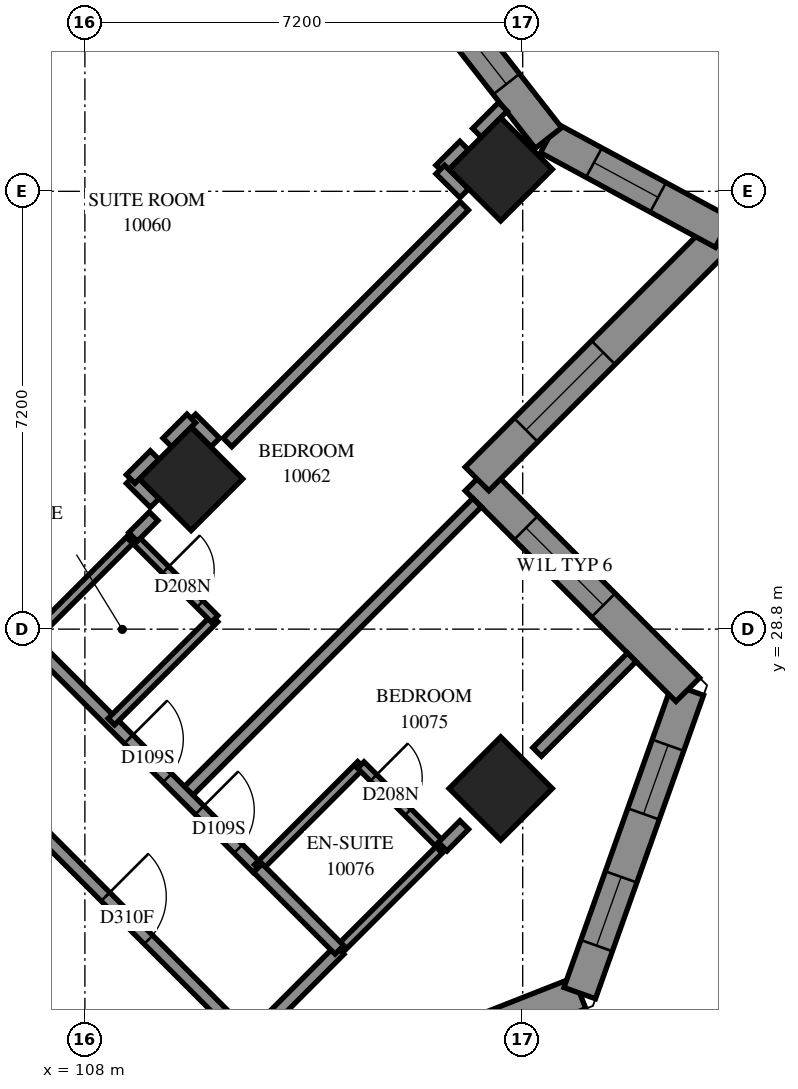
"""IFC4 building model, lengths in metres.
Left out: names, types, materials, properties, quantities, classifications, styles, units other than length and angle.
Written with IfcOpenShell. Run it as: python <this file> out.ifc"""

import sys

from ifc_helpers import new_model, si_unit, direction, frame, frame_2d, origin, origin_2d, place, context, subcontext, project, spatial, polyline, rectangle, outline, extrude, element, fill, save


model = new_model("IFC4")
c1 = context("Model", 3, precision=1e-05, world=origin(), true_north=direction((0.0, 1.0)))
c2 = subcontext(c1, "Body", "Model", "MODEL_VIEW")
j1 = project(units=[si_unit("LENGTHUNIT", "METRE"), si_unit("PLANEANGLEUNIT", "RADIAN")], contexts=[c1])
p1 = place(None, origin())
s1 = spatial("IfcSite", under=j1, at=p1, CompositionType="ELEMENT")
p2 = place(p1, origin())
s2 = spatial("IfcBuilding", under=s1, at=p2, CompositionType="ELEMENT")
p3 = place(p2, frame((0.0, 0.0, 40.6)))
s3 = spatial("IfcBuildingStorey", under=s2, at=p3, CompositionType="ELEMENT", Elevation=40.6)
for number, where, z_axis, x_axis in (
    (1, (114.838, 36.362, 0.0), (0.0, 0.0, 1.0), (0.707, -0.707, 0.0)),
    (2, (109.747, 31.271, 0.0), (0.0, 0.0, 1.0), (0.707, -0.707, 0.0)),
    (3, (114.838, 26.18, 0.0), (0.0, 0.0, 1.0), (0.707, -0.707, 0.0)),
):
    element("IfcColumn", number, at=place(p3, frame(where, z_axis=z_axis, x_axis=x_axis)), inside=s3, PredefinedType="COLUMN", context=c2, shape_type="SweptSolid", body=[
        extrude(rectangle(XDim=1.2, YDim=1.2, at=origin_2d()), origin(), (0.0, 0.0, 1.0), 3.1),
    ])
p4 = place(p3, frame((111.012, 20.798, 0.0), z_axis=(0.0, 0.0, 1.0), x_axis=(0.9305394819, 0.3661915791, 0.0)))
e4 = element("IfcWall", 4, at=p4, inside=s3, PredefinedType="SOLIDWALL", context=c2, shape_type="SweptSolid", body=[
    extrude(outline(polyline([(0.12, -0.275), (5.633, -0.275), (5.383, 0.275), (-0.12, 0.275), (0.12, -0.275)])), origin(), (0.0, 0.0, 1.0), 3.1),
])
p5 = place(p4, frame((1.166, 0.0, 0.5)))
e5 = element("IfcOpeningElement", 5, at=p5, cuts=e4, PredefinedType="OPENING", context=c2, shape_type="SweptSolid", body=[
    extrude(rectangle(XDim=2.8, YDim=2.45, at=frame_2d((1.4, 1.225))), frame((0.0, 0.285, 0.0), z_axis=(0.0, -1.0, 0.0), x_axis=(1.0, 0.0, 0.0)), (0.0, 0.0, 1.0), 0.57),
])
p6 = place(p3, frame((116.138, 22.815, 0.0), z_axis=(0.0, 0.0, 1.0), x_axis=(0.3355194748, 0.9420332701, 0.0)))
e6 = element("IfcWall", 6, at=p6, inside=s3, PredefinedType="SOLIDWALL", context=c2, shape_type="SweptSolid", body=[
    extrude(outline(polyline([(-0.125, -0.275), (5.471, -0.275), (5.123, 0.275), (0.125, 0.275), (-0.125, -0.275)])), origin(), (0.0, 0.0, 1.0), 3.1),
])
p7 = place(p6, frame((0.828, 0.0, 0.5)))
e7 = element("IfcOpeningElement", 7, at=p7, cuts=e6, PredefinedType="OPENING", context=c2, shape_type="SweptSolid", body=[
    extrude(rectangle(XDim=1.2, YDim=2.45, at=frame_2d((0.6, 1.225))), frame((0.0, 0.285, 0.0), z_axis=(0.0, -1.0, 0.0), x_axis=(1.0, 0.0, 0.0)), (0.0, 0.0, 1.0), 0.57),
])
p8 = place(p6, frame((3.127, 0.0, 0.5)))
e8 = element("IfcOpeningElement", 8, at=p8, cuts=e6, PredefinedType="OPENING", context=c2, shape_type="SweptSolid", body=[
    extrude(rectangle(XDim=1.2, YDim=2.45, at=frame_2d((0.6, 1.225))), frame((0.0, 0.285, 0.0), z_axis=(0.0, -1.0, 0.0), x_axis=(1.0, 0.0, 0.0)), (0.0, 0.0, 1.0), 0.57),
])
p9 = place(p3, frame((117.915, 27.805, 0.0), z_axis=(0.0, 0.0, 1.0), x_axis=(-0.7071067812, 0.7071067812, 0.0)))
e9 = element("IfcWall", 9, at=p9, inside=s3, PredefinedType="SOLIDWALL", context=c2, shape_type="SweptSolid", body=[
    extrude(outline(polyline([(-0.174, -0.275), (4.626, -0.275), (5.176, 0.275), (0.174, 0.275), (-0.174, -0.275)])), origin(), (0.0, 0.0, 1.0), 3.1),
])
p10 = place(p9, frame((1.964, 0.0, 0.6)))
e10 = element("IfcOpeningElement", 10, at=p10, cuts=e9, PredefinedType="OPENING", context=c2, shape_type="SweptSolid", body=[
    extrude(rectangle(XDim=1.8, YDim=1.9, at=frame_2d((0.9, 0.95))), frame((0.0, 0.285, 0.0), z_axis=(0.0, -1.0, 0.0), x_axis=(1.0, 0.0, 0.0)), (0.0, 0.0, 1.0), 0.57),
])
p11 = place(p3, frame((114.449, 31.271, 0.0), z_axis=(0.0, 0.0, 1.0), x_axis=(0.7070980511, 0.7071155112, 0.0)))
e11 = element("IfcWall", 11, at=p11, inside=s3, PredefinedType="SOLIDWALL", context=c2, shape_type="SweptSolid", body=[
    extrude(outline(polyline([(0.275, -0.275), (6.096, -0.275), (5.359, 0.275), (-0.275, 0.275), (0.275, -0.275)])), origin(), (0.0, 0.0, 1.0), 3.1),
])
p12 = place(p11, frame((1.137, 0.0, 0.6)))
e12 = element("IfcOpeningElement", 12, at=p12, cuts=e11, PredefinedType="OPENING", context=c2, shape_type="SweptSolid", body=[
    extrude(rectangle(XDim=1.8, YDim=1.9, at=frame_2d((0.9, 0.95))), frame((0.0, 0.285, 0.0), z_axis=(0.0, -1.0, 0.0), x_axis=(1.0, 0.0, 0.0)), (0.0, 0.0, 1.0), 0.57),
])
p13 = place(p3, frame((118.499, 35.321, 0.0), z_axis=(0.0, 0.0, 1.0), x_axis=(-0.8793629348, 0.476152107, 0.0)))
e13 = element("IfcWall", 13, at=p13, inside=s3, PredefinedType="SOLIDWALL", context=c2, shape_type="SweptSolid", body=[
    extrude(outline(polyline([(-0.369, -0.275), (3.212, -0.275), (3.327, 0.275), (0.369, 0.275), (-0.369, -0.275)])), origin(), (0.0, 0.0, 1.0), 3.1),
])
p14 = place(p13, frame((1.219, 0.0, 0.5)))
e14 = element("IfcOpeningElement", 14, at=p14, cuts=e13, PredefinedType="OPENING", context=c2, shape_type="SweptSolid", body=[
    extrude(rectangle(XDim=1.2, YDim=2.45, at=frame_2d((0.6, 1.225))), frame((0.0, 0.285, 0.0), z_axis=(0.0, -1.0, 0.0), x_axis=(1.0, 0.0, 0.0)), (0.0, 0.0, 1.0), 0.57),
])
p15 = place(p3, frame((115.624, 36.877, 0.0), z_axis=(0.0, 0.0, 1.0), x_axis=(-0.6157582888, 0.7879351051, 0.0)))
e15 = element("IfcWall", 15, at=p15, inside=s3, PredefinedType="SOLIDWALL", context=c2, shape_type="SweptSolid", body=[
    extrude(outline(polyline([(0.057, -0.275), (3.516, -0.275), (3.448, 0.275), (-0.057, 0.275), (0.057, -0.275)])), origin(), (0.0, 0.0, 1.0), 3.1),
])
p16 = place(p15, frame((1.124, 0.0, 0.5)))
e16 = element("IfcOpeningElement", 16, at=p16, cuts=e15, PredefinedType="OPENING", context=c2, shape_type="SweptSolid", body=[
    extrude(rectangle(XDim=1.2, YDim=2.45, at=frame_2d((0.6, 1.225))), frame((0.0, 0.285, 0.0), z_axis=(0.0, -1.0, 0.0), x_axis=(1.0, 0.0, 0.0)), (0.0, 0.0, 1.0), 0.57),
])
p17 = place(p3, frame((99.459, 36.255, 0.0), z_axis=(0.0, 0.0, 1.0), x_axis=(0.7071905616, 0.7070229908, 0.0)))
e17 = element("IfcWall", 17, at=p17, inside=s3, PredefinedType="PARTITIONING", context=c2, shape_type="SweptSolid", body=[
    extrude(rectangle(XDim=11.935, YDim=0.2, at=frame_2d((5.968, 0.0))), origin(), (0.0, 0.0, 1.0), 3.1),
])
p18 = place(p3, frame((103.061, 29.677, 0.0), z_axis=(0.0, 0.0, 1.0), x_axis=(0.7071067812, -0.7071067812, 0.0)))
e18 = element("IfcWall", 18, at=p18, inside=s3, PredefinedType="PARTITIONING", context=c2, shape_type="SweptSolid", body=[
    extrude(rectangle(XDim=10.802, YDim=0.2, at=frame_2d((5.401, 0.0))), origin(), (0.0, 0.0, 1.0), 3.1),
])
p19 = place(p18, frame((2.012, 0.0, 0.0)))
e19 = element("IfcOpeningElement", 19, at=p19, cuts=e18, PredefinedType="OPENING", context=c2, shape_type="SweptSolid", body=[
    extrude(rectangle(XDim=0.9, YDim=2.1, at=frame_2d((0.45, 1.05))), frame((0.0, 0.11, 0.0), z_axis=(0.0, -1.0, 0.0), x_axis=(1.0, 0.0, 0.0)), (0.0, 0.0, 1.0), 0.22),
])
p20 = place(p18, frame((7.463, 0.0, 0.0)))
e20 = element("IfcOpeningElement", 20, at=p20, cuts=e18, PredefinedType="OPENING", context=c2, shape_type="SweptSolid", body=[
    extrude(rectangle(XDim=1.0, YDim=2.1, at=frame_2d((0.5, 1.05))), frame((0.0, 0.11, 0.0), z_axis=(0.0, -1.0, 0.0), x_axis=(1.0, 0.0, 0.0)), (0.0, 0.0, 1.0), 0.22),
])
p21 = place(p3, frame((109.64, 26.074, 0.0), z_axis=(0.0, 0.0, 1.0), x_axis=(0.7072538194, 0.7069597124, 0.0)))
e21 = element("IfcWall", 21, at=p21, inside=s3, PredefinedType="PARTITIONING", context=c2, shape_type="SweptSolid", body=[
    extrude(rectangle(XDim=6.8, YDim=0.2, at=frame_2d((3.4, 0.0))), origin(), (0.0, 0.0, 1.0), 3.1),
])
for number, where, z_axis, x_axis in (
    (22, (110.345, 31.871, 0.0), (0.0, 0.0, 1.0), (0.707, 0.707, 0.0)),
    (23, (105.255, 36.963, 0.0), (0.0, 0.0, 1.0), (0.707, 0.707, 0.0)),
):
    element("IfcWall", number, at=place(p3, frame(where, z_axis=z_axis, x_axis=x_axis)), inside=s3, PredefinedType="PARTITIONING", context=c2, shape_type="SweptSolid", body=[
        extrude(rectangle(XDim=5.504, YDim=0.2, at=frame_2d((2.752, 0.0))), origin(), (0.0, 0.0, 1.0), 3.1),
    ])
p22 = place(p3, frame((107.093, 28.615, 0.0), z_axis=(0.0, 0.0, 1.0), x_axis=(0.7072011313, -0.7070124185, 0.0)))
e24 = element("IfcWall", 24, at=p22, inside=s3, PredefinedType="PARTITIONING", context=c2, shape_type="SweptSolid", body=[
    extrude(rectangle(XDim=5.299, YDim=0.2, at=frame_2d((2.65, 0.0))), origin(), (0.0, 0.0, 1.0), 3.1),
])
p23 = place(p22, frame((2.299, 0.0, 0.0)))
e25 = element("IfcOpeningElement", 25, at=p23, cuts=e24, PredefinedType="OPENING", context=c2, shape_type="SweptSolid", body=[
    extrude(rectangle(XDim=0.9, YDim=2.1, at=frame_2d((0.45, 1.05))), frame((0.0, 0.11, 0.0), z_axis=(0.0, -1.0, 0.0), x_axis=(1.0, 0.0, 0.0)), (0.0, 0.0, 1.0), 0.22),
])
p24 = place(p22, frame((3.949, 0.0, 0.0)))
e26 = element("IfcOpeningElement", 26, at=p24, cuts=e24, PredefinedType="OPENING", context=c2, shape_type="SweptSolid", body=[
    extrude(rectangle(XDim=0.9, YDim=2.1, at=frame_2d((0.45, 1.05))), frame((0.0, 0.11, 0.0), z_axis=(0.0, -1.0, 0.0), x_axis=(1.0, 0.0, 0.0)), (0.0, 0.0, 1.0), 0.22),
])
p25 = place(p3, frame((108.435, 27.279, 0.0), z_axis=(0.0, 0.0, 1.0), x_axis=(0.7075233388, 0.706689978, 0.0)))
e27 = element("IfcWall", 27, at=p25, inside=s3, PredefinedType="PARTITIONING", context=c2, shape_type="SweptSolid", body=[
    extrude(rectangle(XDim=2.4, YDim=0.15, at=frame_2d((1.2, 0.0))), origin(), (0.0, 0.0, 1.0), 3.1),
])
p26 = place(p3, frame((112.183, 23.531, 0.0), z_axis=(0.0, 0.0, 1.0), x_axis=(0.7075233388, 0.706689978, 0.0)))
e28 = element("IfcWall", 28, at=p26, inside=s3, PredefinedType="PARTITIONING", context=c2, shape_type="SweptSolid", body=[
    extrude(rectangle(XDim=2.4, YDim=0.15, at=frame_2d((1.2, 0.0))), origin(), (0.0, 0.0, 1.0), 2.6),
])
for number, where, z_axis, x_axis in (
    (29, (107.095, 28.621, 0.0), (0.0, 0.0, 1.0), (0.707, 0.707, 0.0)),
    (30, (110.843, 24.873, 0.0), (0.0, 0.0, 1.0), (0.707, 0.707, 0.0)),
):
    element("IfcWall", number, at=place(p3, frame(where, z_axis=z_axis, x_axis=x_axis)), inside=s3, PredefinedType="PARTITIONING", context=c2, shape_type="SweptSolid", body=[
        extrude(rectangle(XDim=2.398, YDim=0.15, at=frame_2d((1.199, 0.0))), origin(), (0.0, 0.0, 1.0), 3.1),
    ])
p27 = place(p3, frame((115.438, 26.78, 0.0), z_axis=(0.0, 0.0, 1.0), x_axis=(0.7071067812, 0.7071067812, 0.0)))
e31 = element("IfcWall", 31, at=p27, inside=s3, PredefinedType="PARTITIONING", context=c2, shape_type="SweptSolid", body=[
    extrude(rectangle(XDim=2.201, YDim=0.2, at=frame_2d((1.101, 0.0))), origin(), (0.0, 0.0, 1.0), 3.1),
])
p28 = place(p3, frame((110.705, 22.039, 0.0), z_axis=(0.0, 0.0, 1.0), x_axis=(0.7066304548, 0.7075827869, 0.0)))
e32 = element("IfcWall", 32, at=p28, inside=s3, PredefinedType="PARTITIONING", context=c2, shape_type="SweptSolid", body=[
    extrude(rectangle(XDim=2.1, YDim=0.2, at=frame_2d((1.05, 0.0))), origin(), (0.0, 0.0, 1.0), 2.6),
])
p29 = place(p3, frame((108.789, 30.313, 0.0), z_axis=(0.0, 0.0, 1.0), x_axis=(0.7071067812, -0.7071067812, 0.0)))
e33 = element("IfcWall", 33, at=p29, inside=s3, PredefinedType="PARTITIONING", context=c2, shape_type="SweptSolid", body=[
    extrude(rectangle(XDim=1.901, YDim=0.15, at=frame_2d((0.95, 0.0))), origin(), (0.0, 0.0, 1.0), 3.1),
])
p30 = place(p29, frame((0.76, 0.0, 0.0)))
e34 = element("IfcOpeningElement", 34, at=p30, cuts=e33, PredefinedType="OPENING", context=c2, shape_type="SweptSolid", body=[
    extrude(rectangle(XDim=0.8, YDim=2.1, at=frame_2d((0.4, 1.05))), frame((0.0, 0.085, 0.0), z_axis=(0.0, -1.0, 0.0), x_axis=(1.0, 0.0, 0.0)), (0.0, 0.0, 1.0), 0.17),
])
p31 = place(p3, frame((112.537, 26.565, 0.0), z_axis=(0.0, 0.0, 1.0), x_axis=(0.7071067812, -0.7071067812, 0.0)))
e35 = element("IfcWall", 35, at=p31, inside=s3, PredefinedType="PARTITIONING", context=c2, shape_type="SweptSolid", body=[
    extrude(rectangle(XDim=1.901, YDim=0.15, at=frame_2d((0.95, 0.0))), origin(), (0.0, 0.0, 1.0), 3.1),
])
p32 = place(p31, frame((0.297, 0.0, 0.0)))
e36 = element("IfcOpeningElement", 36, at=p32, cuts=e35, PredefinedType="OPENING", context=c2, shape_type="SweptSolid", body=[
    extrude(rectangle(XDim=0.8, YDim=2.1, at=frame_2d((0.4, 1.05))), frame((0.0, 0.085, 0.0), z_axis=(0.0, -1.0, 0.0), x_axis=(1.0, 0.0, 0.0)), (0.0, 0.0, 1.0), 0.17),
])
p33 = place(p3, frame((110.843, 24.871, 0.0), z_axis=(0.0, 0.0, 1.0), x_axis=(0.7065800724, -0.7076330979, 0.0)))
e37 = element("IfcWall", 37, at=p33, inside=s3, PredefinedType="PARTITIONING", context=c2, shape_type="SweptSolid", body=[
    extrude(rectangle(XDim=1.899, YDim=0.2, at=frame_2d((0.95, 0.0))), origin(), (0.0, 0.0, 1.0), 3.1),
])
for number, where, z_axis, x_axis in (
    (38, (113.843, 36.359, 0.0), (0.0, 0.0, 1.0), (0.707, 0.707, 0.0)),
    (39, (108.754, 31.268, 0.0), (0.0, 0.0, 1.0), (0.707, -0.707, 0.0)),
    (40, (109.751, 32.265, 0.0), (0.0, 0.0, 1.0), (0.707, -0.707, 0.0)),
    (41, (109.355, 31.871, 0.0), (0.0, 0.0, 1.0), (0.707, 0.707, 0.0)),
    (42, (108.753, 31.269, 0.0), (0.0, 0.0, 1.0), (0.707, 0.707, 0.0)),
):
    element("IfcWall", number, at=place(p3, frame(where, z_axis=z_axis, x_axis=x_axis)), inside=s3, PredefinedType="PARTITIONING", context=c2, shape_type="SweptSolid", body=[
        extrude(rectangle(XDim=0.557, YDim=0.2, at=frame_2d((0.279, 0.0))), origin(), (0.0, 0.0, 1.0), 3.1),
    ])
p34 = place(p3, frame((113.845, 36.359, 0.0), z_axis=(0.0, 0.0, 1.0), x_axis=(0.7089037401, -0.705305244, 0.0)))
e43 = element("IfcWall", 43, at=p34, inside=s3, PredefinedType="PARTITIONING", context=c2, shape_type="SweptSolid", body=[
    extrude(rectangle(XDim=0.556, YDim=0.2, at=frame_2d((0.278, 0.0))), origin(), (0.0, 0.0, 1.0), 3.1),
])
p35 = place(p3, frame((114.447, 36.963, 0.0), z_axis=(0.0, 0.0, 1.0), x_axis=(0.7070239866, 0.707189566, 0.0)))
e44 = element("IfcWall", 44, at=p35, inside=s3, PredefinedType="PARTITIONING", context=c2, shape_type="SweptSolid", body=[
    extrude(rectangle(XDim=0.604, YDim=0.2, at=frame_2d((0.302, 0.0))), origin(), (0.0, 0.0, 1.0), 3.1),
])
p36 = place(p3, frame((113.885, 25.223, 0.0), z_axis=(0.0, 0.0, 1.0), x_axis=(0.7051121336, 0.709095818, 0.0)))
e45 = element("IfcWall", 45, at=p36, inside=s3, PredefinedType="PARTITIONING", context=c2, shape_type="SweptSolid", body=[
    extrude(rectangle(XDim=0.502, YDim=0.2, at=frame_2d((0.251, 0.0))), origin(), (0.0, 0.0, 1.0), 2.6),
])
p37 = place(p3, frame((108.791, 30.317, 0.0), z_axis=(0.0, 0.0, 1.0), x_axis=(0.7071067812, 0.7071067812, 0.0)))
e46 = element("IfcWall", 46, at=p37, inside=s3, PredefinedType="PARTITIONING", context=c2, shape_type="SweptSolid", body=[
    extrude(rectangle(XDim=0.481, YDim=0.2, at=frame_2d((0.24, 0.0))), origin(), (0.0, 0.0, 1.0), 3.1),
])
p38 = place(p7, origin())
e47 = element("IfcWindow", 47, at=p38, inside=s3, PartitioningType="SINGLE_PANEL", PredefinedType="WINDOW", context=c2, shape_type="SweptSolid", body=[
    extrude(rectangle(XDim=1.2, YDim=2.45, at=frame_2d((0.6, 1.225))), frame((0.0, 0.155, 0.0), z_axis=(0.0, -1.0, 0.0), x_axis=(1.0, 0.0, 0.0)), (0.0, 0.0, 1.0), 0.06),
])
fill(e7, e47)
p39 = place(p8, origin())
e48 = element("IfcWindow", 48, at=p39, inside=s3, PartitioningType="SINGLE_PANEL", PredefinedType="WINDOW", context=c2, shape_type="SweptSolid", body=[
    extrude(rectangle(XDim=1.2, YDim=2.45, at=frame_2d((0.6, 1.225))), frame((0.0, 0.155, 0.0), z_axis=(0.0, -1.0, 0.0), x_axis=(1.0, 0.0, 0.0)), (0.0, 0.0, 1.0), 0.06),
])
fill(e8, e48)
p40 = place(p10, origin())
e49 = element("IfcWindow", 49, at=p40, inside=s3, PartitioningType="SINGLE_PANEL", PredefinedType="WINDOW", context=c2, shape_type="SweptSolid", body=[
    extrude(rectangle(XDim=1.8, YDim=1.9, at=frame_2d((0.9, 0.95))), frame((0.0, 0.155, 0.0), z_axis=(0.0, -1.0, 0.0), x_axis=(1.0, 0.0, 0.0)), (0.0, 0.0, 1.0), 0.06),
])
fill(e10, e49)
p41 = place(p12, origin())
e50 = element("IfcWindow", 50, at=p41, inside=s3, PartitioningType="SINGLE_PANEL", PredefinedType="WINDOW", context=c2, shape_type="SweptSolid", body=[
    extrude(rectangle(XDim=1.8, YDim=1.9, at=frame_2d((0.9, 0.95))), frame((0.0, 0.155, 0.0), z_axis=(0.0, -1.0, 0.0), x_axis=(1.0, 0.0, 0.0)), (0.0, 0.0, 1.0), 0.06),
])
fill(e12, e50)
p42 = place(p14, origin())
e51 = element("IfcWindow", 51, at=p42, inside=s3, PartitioningType="SINGLE_PANEL", PredefinedType="WINDOW", context=c2, shape_type="SweptSolid", body=[
    extrude(rectangle(XDim=1.2, YDim=2.45, at=frame_2d((0.6, 1.225))), frame((0.0, 0.155, 0.0), z_axis=(0.0, -1.0, 0.0), x_axis=(1.0, 0.0, 0.0)), (0.0, 0.0, 1.0), 0.06),
])
fill(e14, e51)
p43 = place(p16, origin())
e52 = element("IfcWindow", 52, at=p43, inside=s3, PartitioningType="SINGLE_PANEL", PredefinedType="WINDOW", context=c2, shape_type="SweptSolid", body=[
    extrude(rectangle(XDim=1.2, YDim=2.45, at=frame_2d((0.6, 1.225))), frame((0.0, 0.155, 0.0), z_axis=(0.0, -1.0, 0.0), x_axis=(1.0, 0.0, 0.0)), (0.0, 0.0, 1.0), 0.06),
])
fill(e16, e52)
p44 = place(p23, origin())
e53 = element("IfcDoor", 53, at=p44, inside=s3, OperationType="SINGLE_SWING_LEFT", PredefinedType="DOOR", context=c2, shape_type="SweptSolid", body=[
    extrude(rectangle(XDim=0.9, YDim=2.1, at=frame_2d((0.45, 1.05))), frame((0.0, 0.025, 0.0), z_axis=(0.0, -1.0, 0.0), x_axis=(1.0, 0.0, 0.0)), (0.0, 0.0, 1.0), 0.05),
])
fill(e25, e53)
p45 = place(p30, origin())
e54 = element("IfcDoor", 54, at=p45, inside=s3, OperationType="SINGLE_SWING_RIGHT", PredefinedType="DOOR", context=c2, shape_type="SweptSolid", body=[
    extrude(rectangle(XDim=0.8, YDim=2.1, at=frame_2d((0.4, 1.05))), frame((0.0, 0.025, 0.0), z_axis=(0.0, -1.0, 0.0), x_axis=(1.0, 0.0, 0.0)), (0.0, 0.0, 1.0), 0.05),
])
fill(e34, e54)
p46 = place(p20, origin())
e55 = element("IfcDoor", 55, at=p46, inside=s3, OperationType="SINGLE_SWING_RIGHT", PredefinedType="DOOR", context=c2, shape_type="SweptSolid", body=[
    extrude(rectangle(XDim=1.0, YDim=2.1, at=frame_2d((0.5, 1.05))), frame((0.0, 0.025, 0.0), z_axis=(0.0, -1.0, 0.0), x_axis=(1.0, 0.0, 0.0)), (0.0, 0.0, 1.0), 0.05),
])
fill(e20, e55)
p47 = place(p24, origin())
e56 = element("IfcDoor", 56, at=p47, inside=s3, OperationType="SINGLE_SWING_RIGHT", PredefinedType="DOOR", context=c2, shape_type="SweptSolid", body=[
    extrude(rectangle(XDim=0.9, YDim=2.1, at=frame_2d((0.45, 1.05))), frame((0.0, 0.025, 0.0), z_axis=(0.0, -1.0, 0.0), x_axis=(1.0, 0.0, 0.0)), (0.0, 0.0, 1.0), 0.05),
])
fill(e26, e56)
p48 = place(p32, origin())
e57 = element("IfcDoor", 57, at=p48, inside=s3, OperationType="SINGLE_SWING_RIGHT", PredefinedType="DOOR", context=c2, shape_type="SweptSolid", body=[
    extrude(rectangle(XDim=0.8, YDim=2.1, at=frame_2d((0.4, 1.05))), frame((0.0, 0.025, 0.0), z_axis=(0.0, -1.0, 0.0), x_axis=(1.0, 0.0, 0.0)), (0.0, 0.0, 1.0), 0.05),
])
fill(e36, e57)
save(model, sys.argv[1])
